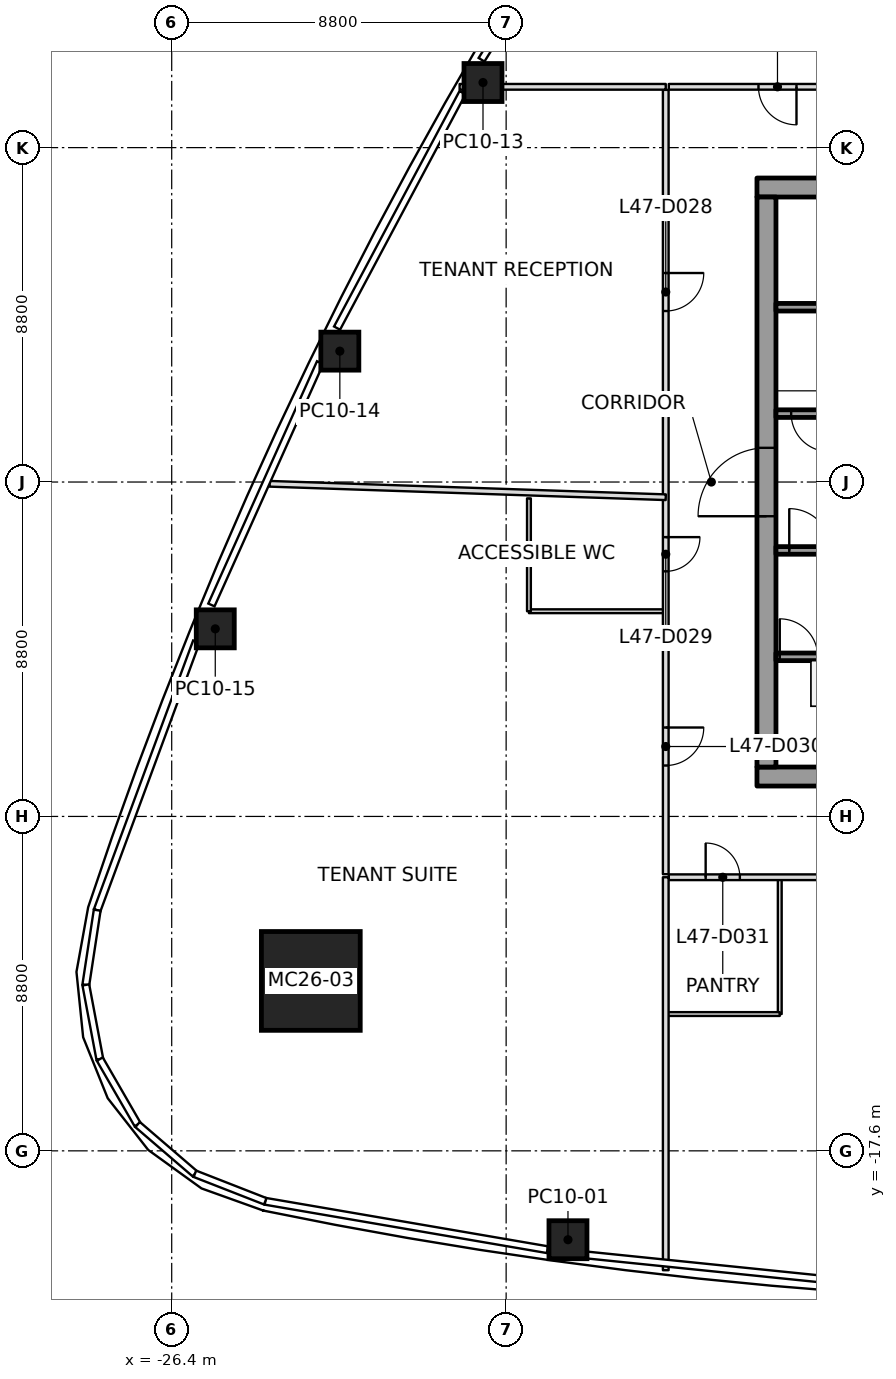
"""IFC4 building model, lengths in metres.
Left out: names, types, materials, properties, quantities, classifications, styles, units other than length and angle.
Written with IfcOpenShell. Run it as: python <this file> out.ifc"""

import sys

from ifc_helpers import new_model, si_unit, direction, frame, frame_2d, origin, origin_2d, place, context, subcontext, project, spatial, rectangle, extrude, clip, halfspace, element, fill, save


model = new_model("IFC4")
c1 = context("Model", 3, precision=1e-05, world=origin(), true_north=direction((0.0, 1.0)))
c2 = subcontext(c1, "Body", "Model", "MODEL_VIEW")
j1 = project(units=[si_unit("LENGTHUNIT", "METRE"), si_unit("PLANEANGLEUNIT", "RADIAN")], contexts=[c1])
p1 = place(None, origin())
s1 = spatial("IfcSite", under=j1, at=p1, CompositionType="ELEMENT")
p2 = place(p1, origin())
s2 = spatial("IfcBuilding", under=s1, at=p2, CompositionType="ELEMENT")
p3 = place(p2, frame((0.0, 0.0, 209.8)))
s3 = spatial("IfcBuildingStorey", under=s2, at=p3, CompositionType="ELEMENT", Elevation=209.8)
p4 = place(p3, frame((-22.74, -13.129, 0.0), z_axis=(0.02793953433, 0.016165887767, 0.999478887468), x_axis=(0.99960961501, -0.000451843769, -0.027935880437)))
e1 = element("IfcColumn", 1, at=p4, inside=s3, PredefinedType="COLUMN", context=c2, shape_type="SweptSolid", body=[
    clip(extrude(rectangle(XDim=2.6, YDim=2.6, at=origin_2d()), origin(), (0.0, 0.0, 1.0), 4.002), halfspace(frame((0.0, 0.0, 3.992)), False)),
])
p5 = place(p3, frame((-15.973, -19.939, 0.0), z_axis=(0.017574453011, 0.010434831475, 0.999791104628), x_axis=(-0.990627244409, 0.135653016155, 0.015997557411)))
e2 = element("IfcColumn", 2, at=p5, inside=s3, PredefinedType="COLUMN", context=c2, shape_type="SweptSolid", body=[
    clip(extrude(rectangle(XDim=1.0, YDim=1.0, at=origin_2d()), origin(), (0.0, 0.0, 1.0), 4.001), halfspace(frame((0.0, 0.0, 3.998)), False)),
])
p6 = place(p3, frame((-18.209, 10.513, 0.0), z_axis=(0.009887049298, -0.00573692984, 0.999934664812), x_axis=(0.499975560967, 0.866039512843, 2.5126546e-05)))
e3 = element("IfcColumn", 3, at=p6, inside=s3, PredefinedType="COLUMN", context=c2, shape_type="SweptSolid", body=[
    clip(extrude(rectangle(XDim=1.0, YDim=1.0, at=origin_2d()), origin(), (0.0, 0.0, 1.0), 4.0), halfspace(frame((0.0, 0.0, 3.999)), False)),
])
p7 = place(p3, frame((-21.976, 3.444, 0.0), z_axis=(0.014097691364, 0.002013955909, 0.999898594398), x_axis=(0.440002016218, 0.897961039861, -0.008012279057)))
e4 = element("IfcColumn", 4, at=p7, inside=s3, PredefinedType="COLUMN", context=c2, shape_type="SweptSolid", body=[
    clip(extrude(rectangle(XDim=1.0, YDim=1.0, at=origin_2d()), origin(), (0.0, 0.0, 1.0), 4.0), halfspace(frame((0.0, 0.0, 3.998)), False)),
])
p8 = place(p3, frame((-25.254, -3.864, 0.0), z_axis=(0.017818543466, 0.010007675097, 0.999791151165), x_axis=(0.378002138805, 0.925666409235, -0.016002558328)))
e5 = element("IfcColumn", 5, at=p8, inside=s3, PredefinedType="COLUMN", context=c2, shape_type="SweptSolid", body=[
    clip(extrude(rectangle(XDim=1.0, YDim=1.0, at=origin_2d()), origin(), (0.0, 0.0, 1.0), 4.001), halfspace(frame((0.0, 0.0, 3.998)), False)),
])
p9 = place(p3, frame((-11.0, -7.75, 0.0), z_axis=(0.0, 0.0, 1.0), x_axis=(1.0, 0.0, 0.0)))
e6 = element("IfcWall", 6, at=p9, inside=s3, PredefinedType="SHEAR", context=c2, shape_type="SweptSolid", body=[
    extrude(rectangle(XDim=22.0, YDim=0.5, at=frame_2d((11.0, 0.0))), origin(), (0.0, 0.0, 1.0), 4.0),
])
p10 = place(p9, frame((10.45, 0.0, 0.0)))
e7 = element("IfcOpeningElement", 7, at=p10, cuts=e6, PredefinedType="OPENING", context=c2, shape_type="SweptSolid", body=[
    extrude(rectangle(XDim=1.1, YDim=2.1, at=frame_2d((0.55, 1.05))), frame((0.0, 0.25, 0.0), z_axis=(0.0, -1.0, 0.0), x_axis=(1.0, 0.0, 0.0)), (0.0, 0.0, 1.0), 0.5),
])
p11 = place(p3, frame((-11.0, 7.75, 0.0), z_axis=(0.0, 0.0, 1.0), x_axis=(1.0, 0.0, 0.0)))
e8 = element("IfcWall", 8, at=p11, inside=s3, PredefinedType="SHEAR", context=c2, shape_type="SweptSolid", body=[
    extrude(rectangle(XDim=22.0, YDim=0.5, at=frame_2d((11.0, 0.0))), origin(), (0.0, 0.0, 1.0), 4.0),
])
p12 = place(p11, frame((10.45, 0.0, 0.0)))
e9 = element("IfcOpeningElement", 9, at=p12, cuts=e8, PredefinedType="OPENING", context=c2, shape_type="SweptSolid", body=[
    extrude(rectangle(XDim=1.1, YDim=2.1, at=frame_2d((0.55, 1.05))), frame((0.0, 0.25, 0.0), z_axis=(0.0, -1.0, 0.0), x_axis=(1.0, 0.0, 0.0)), (0.0, 0.0, 1.0), 0.5),
])
p13 = place(p3, frame((-10.75, -7.5, 0.0), z_axis=(0.0, 0.0, 1.0), x_axis=(0.0, 1.0, 0.0)))
e10 = element("IfcWall", 10, at=p13, inside=s3, PredefinedType="SHEAR", context=c2, shape_type="SweptSolid", body=[
    extrude(rectangle(XDim=15.0, YDim=0.5, at=frame_2d((7.5, 0.0))), origin(), (0.0, 0.0, 1.0), 4.0),
])
p14 = place(p13, frame((6.6, 0.0, 0.0)))
e11 = element("IfcOpeningElement", 11, at=p14, cuts=e10, PredefinedType="OPENING", context=c2, shape_type="SweptSolid", body=[
    extrude(rectangle(XDim=1.8, YDim=2.1, at=frame_2d((0.9, 1.05))), frame((0.0, 0.25, 0.0), z_axis=(0.0, -1.0, 0.0), x_axis=(1.0, 0.0, 0.0)), (0.0, 0.0, 1.0), 0.5),
])
p15 = place(p3, frame((-10.5, -4.6, 0.0), z_axis=(0.0, 0.0, 1.0), x_axis=(1.0, 0.0, 0.0)))
e12 = element("IfcWall", 12, at=p15, inside=s3, PredefinedType="SOLIDWALL", context=c2, shape_type="SweptSolid", body=[
    extrude(rectangle(XDim=1.8, YDim=0.2, at=frame_2d((0.9, 0.0))), origin(), (0.0, 0.0, 1.0), 3.85),
])
p16 = place(p15, frame((0.1, 0.0, 0.0)))
e13 = element("IfcOpeningElement", 13, at=p16, cuts=e12, PredefinedType="OPENING", context=c2, shape_type="SweptSolid", body=[
    extrude(rectangle(XDim=1.0, YDim=2.1, at=frame_2d((0.5, 1.05))), frame((0.0, 0.1, 0.0), z_axis=(0.0, -1.0, 0.0), x_axis=(1.0, 0.0, 0.0)), (0.0, 0.0, 1.0), 0.2),
])
p17 = place(p3, frame((-10.5, -1.8, 0.0), z_axis=(0.0, 0.0, 1.0), x_axis=(1.0, 0.0, 0.0)))
e14 = element("IfcWall", 14, at=p17, inside=s3, PredefinedType="SOLIDWALL", context=c2, shape_type="SweptSolid", body=[
    extrude(rectangle(XDim=1.8, YDim=0.2, at=frame_2d((0.9, 0.0))), origin(), (0.0, 0.0, 1.0), 3.85),
])
p18 = place(p17, frame((0.35, 0.0, 0.0)))
e15 = element("IfcOpeningElement", 15, at=p18, cuts=e14, PredefinedType="OPENING", context=c2, shape_type="SweptSolid", body=[
    extrude(rectangle(XDim=1.1, YDim=2.1, at=frame_2d((0.55, 1.05))), frame((0.0, 0.1, 0.0), z_axis=(0.0, -1.0, 0.0), x_axis=(1.0, 0.0, 0.0)), (0.0, 0.0, 1.0), 0.2),
])
p19 = place(p3, frame((-8.7, 1.8, 0.0), z_axis=(0.0, 0.0, 1.0), x_axis=(-1.0, 0.0, 0.0)))
e16 = element("IfcWall", 16, at=p19, inside=s3, PredefinedType="SOLIDWALL", context=c2, shape_type="SweptSolid", body=[
    extrude(rectangle(XDim=1.8, YDim=0.2, at=frame_2d((0.9, 0.0))), origin(), (0.0, 0.0, 1.0), 3.85),
])
p20 = place(p19, frame((0.4, 0.0, 0.0)))
e17 = element("IfcOpeningElement", 17, at=p20, cuts=e16, PredefinedType="OPENING", context=c2, shape_type="SweptSolid", body=[
    extrude(rectangle(XDim=1.0, YDim=2.1, at=frame_2d((0.5, 1.05))), frame((0.0, 0.1, 0.0), z_axis=(0.0, -1.0, 0.0), x_axis=(1.0, 0.0, 0.0)), (0.0, 0.0, 1.0), 0.2),
])
p21 = place(p3, frame((-8.7, 4.6, 0.0), z_axis=(0.0, 0.0, 1.0), x_axis=(-1.0, 0.0, 0.0)))
e18 = element("IfcWall", 18, at=p21, inside=s3, PredefinedType="SOLIDWALL", context=c2, shape_type="SweptSolid", body=[
    extrude(rectangle(XDim=1.8, YDim=0.2, at=frame_2d((0.9, 0.0))), origin(), (0.0, 0.0, 1.0), 3.85),
])
p22 = place(p3, frame((-13.4, -0.4, 0.0), z_axis=(0.0, 0.0, 1.0), x_axis=(-0.99942554411, 0.033890732954, 0.0)))
e19 = element("IfcWall", 19, at=p22, inside=s3, PredefinedType="PARTITIONING", context=c2, shape_type="SweptSolid", body=[
    extrude(rectangle(XDim=10.431, YDim=0.15, at=frame_2d((5.216, 0.0))), origin(), (0.0, 0.0, 1.0), 3.134),
])
p23 = place(p3, frame((-13.4, 10.4, 0.0), z_axis=(0.0, 0.0, 1.0), x_axis=(-1.0, 0.0, 0.0)))
e20 = element("IfcWall", 20, at=p23, inside=s3, PredefinedType="PARTITIONING", context=c2, shape_type="SweptSolid", body=[
    extrude(rectangle(XDim=5.424, YDim=0.15, at=frame_2d((2.712, 0.0))), origin(), (0.0, 0.0, 1.0), 3.287),
])
p24 = place(p3, frame((-13.4, -10.4, 0.0), z_axis=(0.0, 0.0, 1.0), x_axis=(0.0, -1.0, 0.0)))
e21 = element("IfcWall", 21, at=p24, inside=s3, PredefinedType="PARTITIONING", context=c2, shape_type="SweptSolid", body=[
    extrude(rectangle(XDim=10.341, YDim=0.15, at=frame_2d((5.17, 0.0))), origin(), (0.0, 0.0, 1.0), 3.134),
])
p25 = place(p3, frame((-13.4, 10.32, 0.0), z_axis=(0.0, 0.0, 1.0), x_axis=(0.0, -1.0, 0.0)))
e22 = element("IfcWall", 22, at=p25, inside=s3, PredefinedType="PARTITIONING", context=c2, shape_type="SweptSolid", body=[
    extrude(rectangle(XDim=20.64, YDim=0.15, at=frame_2d((10.32, 0.0))), origin(), (0.0, 0.0, 1.0), 3.066),
])
p26 = place(p25, frame((4.82, 0.0, 0.0)))
e23 = element("IfcOpeningElement", 23, at=p26, cuts=e22, PredefinedType="OPENING", context=c2, shape_type="SweptSolid", body=[
    extrude(rectangle(XDim=1.0, YDim=2.1, at=frame_2d((0.5, 1.05))), frame((0.0, 0.075, 0.0), z_axis=(0.0, -1.0, 0.0), x_axis=(1.0, 0.0, 0.0)), (0.0, 0.0, 1.0), 0.15),
])
p27 = place(p25, frame((11.77, 0.0, 0.0)))
e24 = element("IfcOpeningElement", 24, at=p27, cuts=e22, PredefinedType="OPENING", context=c2, shape_type="SweptSolid", body=[
    extrude(rectangle(XDim=0.9, YDim=2.1, at=frame_2d((0.45, 1.05))), frame((0.0, 0.075, 0.0), z_axis=(0.0, -1.0, 0.0), x_axis=(1.0, 0.0, 0.0)), (0.0, 0.0, 1.0), 0.15),
])
p28 = place(p25, frame((16.78, 0.0, 0.0)))
e25 = element("IfcOpeningElement", 25, at=p28, cuts=e22, PredefinedType="OPENING", context=c2, shape_type="SweptSolid", body=[
    extrude(rectangle(XDim=1.0, YDim=2.1, at=frame_2d((0.5, 1.05))), frame((0.0, 0.075, 0.0), z_axis=(0.0, -1.0, 0.0), x_axis=(1.0, 0.0, 0.0)), (0.0, 0.0, 1.0), 0.15),
])
p29 = place(p3, frame((-13.32, -10.4, 0.0), z_axis=(0.0, 0.0, 1.0), x_axis=(1.0, 0.0, 0.0)))
e26 = element("IfcWall", 26, at=p29, inside=s3, PredefinedType="PARTITIONING", context=c2, shape_type="SweptSolid", body=[
    extrude(rectangle(XDim=26.64, YDim=0.15, at=frame_2d((13.32, 0.0))), origin(), (0.0, 0.0, 1.0), 3.138),
])
p30 = place(p29, frame((0.97, 0.0, 0.0)))
e27 = element("IfcOpeningElement", 27, at=p30, cuts=e26, PredefinedType="OPENING", context=c2, shape_type="SweptSolid", body=[
    extrude(rectangle(XDim=0.9, YDim=2.1, at=frame_2d((0.45, 1.05))), frame((0.0, 0.075, 0.0), z_axis=(0.0, -1.0, 0.0), x_axis=(1.0, 0.0, 0.0)), (0.0, 0.0, 1.0), 0.15),
])
p31 = place(p29, frame((7.12, 0.0, 0.0)))
e28 = element("IfcOpeningElement", 28, at=p31, cuts=e26, PredefinedType="OPENING", context=c2, shape_type="SweptSolid", body=[
    extrude(rectangle(XDim=1.0, YDim=2.1, at=frame_2d((0.5, 1.05))), frame((0.0, 0.075, 0.0), z_axis=(0.0, -1.0, 0.0), x_axis=(1.0, 0.0, 0.0)), (0.0, 0.0, 1.0), 0.15),
])
p32 = place(p29, frame((13.27, 0.0, 0.0)))
e29 = element("IfcOpeningElement", 29, at=p32, cuts=e26, PredefinedType="OPENING", context=c2, shape_type="SweptSolid", body=[
    extrude(rectangle(XDim=0.9, YDim=2.1, at=frame_2d((0.45, 1.05))), frame((0.0, 0.075, 0.0), z_axis=(0.0, -1.0, 0.0), x_axis=(1.0, 0.0, 0.0)), (0.0, 0.0, 1.0), 0.15),
])
p33 = place(p29, frame((20.52, 0.0, 0.0)))
e30 = element("IfcOpeningElement", 30, at=p33, cuts=e26, PredefinedType="OPENING", context=c2, shape_type="SweptSolid", body=[
    extrude(rectangle(XDim=1.0, YDim=2.1, at=frame_2d((0.5, 1.05))), frame((0.0, 0.075, 0.0), z_axis=(0.0, -1.0, 0.0), x_axis=(1.0, 0.0, 0.0)), (0.0, 0.0, 1.0), 0.15),
])
p34 = place(p3, frame((13.32, 10.4, 0.0), z_axis=(0.0, 0.0, 1.0), x_axis=(-1.0, 0.0, 0.0)))
e31 = element("IfcWall", 31, at=p34, inside=s3, PredefinedType="PARTITIONING", context=c2, shape_type="SweptSolid", body=[
    extrude(rectangle(XDim=26.64, YDim=0.15, at=frame_2d((13.32, 0.0))), origin(), (0.0, 0.0, 1.0), 3.066),
])
p35 = place(p34, frame((1.95, 0.0, 0.0)))
e32 = element("IfcOpeningElement", 32, at=p35, cuts=e31, PredefinedType="OPENING", context=c2, shape_type="SweptSolid", body=[
    extrude(rectangle(XDim=0.9, YDim=2.1, at=frame_2d((0.45, 1.05))), frame((0.0, 0.075, 0.0), z_axis=(0.0, -1.0, 0.0), x_axis=(1.0, 0.0, 0.0)), (0.0, 0.0, 1.0), 0.15),
])
p36 = place(p34, frame((10.86, 0.0, 0.0)))
e33 = element("IfcOpeningElement", 33, at=p36, cuts=e31, PredefinedType="OPENING", context=c2, shape_type="SweptSolid", body=[
    extrude(rectangle(XDim=1.0, YDim=2.1, at=frame_2d((0.5, 1.05))), frame((0.0, 0.075, 0.0), z_axis=(0.0, -1.0, 0.0), x_axis=(1.0, 0.0, 0.0)), (0.0, 0.0, 1.0), 0.15),
])
p37 = place(p34, frame((18.77, 0.0, 0.0)))
e34 = element("IfcOpeningElement", 34, at=p37, cuts=e31, PredefinedType="OPENING", context=c2, shape_type="SweptSolid", body=[
    extrude(rectangle(XDim=0.9, YDim=2.1, at=frame_2d((0.45, 1.05))), frame((0.0, 0.075, 0.0), z_axis=(0.0, -1.0, 0.0), x_axis=(1.0, 0.0, 0.0)), (0.0, 0.0, 1.0), 0.15),
])
p38 = place(p34, frame((23.28, 0.0, 0.0)))
e35 = element("IfcOpeningElement", 35, at=p38, cuts=e31, PredefinedType="OPENING", context=c2, shape_type="SweptSolid", body=[
    extrude(rectangle(XDim=1.0, YDim=2.1, at=frame_2d((0.5, 1.05))), frame((0.0, 0.075, 0.0), z_axis=(0.0, -1.0, 0.0), x_axis=(1.0, 0.0, 0.0)), (0.0, 0.0, 1.0), 0.15),
])
p39 = place(p3, frame((-13.43, -3.4, 0.0), z_axis=(0.0, 0.0, 1.0), x_axis=(-1.0, 0.0, 0.0)))
e36 = element("IfcWall", 36, at=p39, inside=s3, PredefinedType="PARTITIONING", context=c2, shape_type="SweptSolid", body=[
    extrude(rectangle(XDim=3.57, YDim=0.1, at=frame_2d((1.785, 0.0))), origin(), (0.0, 0.0, 1.0), 3.138),
])
p40 = place(p3, frame((-17.0, -3.4, 0.0), z_axis=(0.0, 0.0, 1.0), x_axis=(0.0, 1.0, 0.0)))
e37 = element("IfcWall", 37, at=p40, inside=s3, PredefinedType="PARTITIONING", context=c2, shape_type="SweptSolid", body=[
    extrude(rectangle(XDim=2.97, YDim=0.1, at=frame_2d((1.485, 0.0))), origin(), (0.0, 0.0, 1.0), 3.138),
])
p41 = place(p3, frame((-10.4, -10.43, 0.0), z_axis=(0.0, 0.0, 1.0), x_axis=(0.0, -1.0, 0.0)))
e38 = element("IfcWall", 38, at=p41, inside=s3, PredefinedType="PARTITIONING", context=c2, shape_type="SweptSolid", body=[
    extrude(rectangle(XDim=3.57, YDim=0.1, at=frame_2d((1.785, 0.0))), origin(), (0.0, 0.0, 1.0), 3.35),
])
p42 = place(p3, frame((-10.4, -14.0, 0.0), z_axis=(0.0, 0.0, 1.0), x_axis=(-1.0, 0.0, 0.0)))
e39 = element("IfcWall", 39, at=p42, inside=s3, PredefinedType="PARTITIONING", context=c2, shape_type="SweptSolid", body=[
    extrude(rectangle(XDim=2.97, YDim=0.1, at=frame_2d((1.485, 0.0))), origin(), (0.0, 0.0, 1.0), 3.206),
])
p43 = place(p38, origin())
e40 = element("IfcDoor", 40, at=p43, inside=s3, OperationType="SINGLE_SWING_RIGHT", PredefinedType="DOOR", context=c2, shape_type="SweptSolid", body=[
    extrude(rectangle(XDim=1.0, YDim=2.1, at=frame_2d((0.5, 1.05))), frame((0.0, 0.025, 0.0), z_axis=(0.0, -1.0, 0.0), x_axis=(1.0, 0.0, 0.0)), (0.0, 0.0, 1.0), 0.05),
])
fill(e35, e40)
p44 = place(p26, origin())
e41 = element("IfcDoor", 41, at=p44, inside=s3, OperationType="SINGLE_SWING_LEFT", PredefinedType="DOOR", context=c2, shape_type="SweptSolid", body=[
    extrude(rectangle(XDim=1.0, YDim=2.1, at=frame_2d((0.5, 1.05))), frame((0.0, 0.025, 0.0), z_axis=(0.0, -1.0, 0.0), x_axis=(1.0, 0.0, 0.0)), (0.0, 0.0, 1.0), 0.05),
])
fill(e23, e41)
p45 = place(p27, origin())
e42 = element("IfcDoor", 42, at=p45, inside=s3, OperationType="SINGLE_SWING_RIGHT", PredefinedType="DOOR", context=c2, shape_type="SweptSolid", body=[
    extrude(rectangle(XDim=0.9, YDim=2.1, at=frame_2d((0.45, 1.05))), frame((0.0, 0.025, 0.0), z_axis=(0.0, -1.0, 0.0), x_axis=(1.0, 0.0, 0.0)), (0.0, 0.0, 1.0), 0.05),
])
fill(e24, e42)
p46 = place(p28, origin())
e43 = element("IfcDoor", 43, at=p46, inside=s3, OperationType="SINGLE_SWING_RIGHT", PredefinedType="DOOR", context=c2, shape_type="SweptSolid", body=[
    extrude(rectangle(XDim=1.0, YDim=2.1, at=frame_2d((0.5, 1.05))), frame((0.0, 0.025, 0.0), z_axis=(0.0, -1.0, 0.0), x_axis=(1.0, 0.0, 0.0)), (0.0, 0.0, 1.0), 0.05),
])
fill(e25, e43)
p47 = place(p30, origin())
e44 = element("IfcDoor", 44, at=p47, inside=s3, OperationType="SINGLE_SWING_RIGHT", PredefinedType="DOOR", context=c2, shape_type="SweptSolid", body=[
    extrude(rectangle(XDim=0.9, YDim=2.1, at=frame_2d((0.45, 1.05))), frame((0.0, 0.025, 0.0), z_axis=(0.0, -1.0, 0.0), x_axis=(1.0, 0.0, 0.0)), (0.0, 0.0, 1.0), 0.05),
])
fill(e27, e44)
p48 = place(p18, origin())
e45 = element("IfcDoor", 45, at=p48, inside=s3, OperationType="SINGLE_SWING_RIGHT", PredefinedType="DOOR", context=c2, shape_type="SweptSolid", body=[
    extrude(rectangle(XDim=1.1, YDim=2.1, at=frame_2d((0.55, 1.05))), frame((0.0, 0.025, 0.0), z_axis=(0.0, -1.0, 0.0), x_axis=(1.0, 0.0, 0.0)), (0.0, 0.0, 1.0), 0.05),
])
fill(e15, e45)
p49 = place(p20, origin())
e46 = element("IfcDoor", 46, at=p49, inside=s3, OperationType="SINGLE_SWING_RIGHT", PredefinedType="DOOR", context=c2, shape_type="SweptSolid", body=[
    extrude(rectangle(XDim=1.0, YDim=2.1, at=frame_2d((0.5, 1.05))), frame((0.0, 0.025, 0.0), z_axis=(0.0, -1.0, 0.0), x_axis=(1.0, 0.0, 0.0)), (0.0, 0.0, 1.0), 0.05),
])
fill(e17, e46)
p50 = place(p16, origin())
e47 = element("IfcDoor", 47, at=p50, inside=s3, OperationType="SINGLE_SWING_LEFT", PredefinedType="DOOR", context=c2, shape_type="SweptSolid", body=[
    extrude(rectangle(XDim=1.0, YDim=2.1, at=frame_2d((0.5, 1.05))), frame((0.0, 0.025, 0.0), z_axis=(0.0, -1.0, 0.0), x_axis=(1.0, 0.0, 0.0)), (0.0, 0.0, 1.0), 0.05),
])
fill(e13, e47)
p51 = place(p14, origin())
e48 = element("IfcDoor", 48, at=p51, inside=s3, OperationType="DOUBLE_DOOR_SINGLE_SWING", PredefinedType="DOOR", context=c2, shape_type="SweptSolid", body=[
    extrude(rectangle(XDim=1.8, YDim=2.1, at=frame_2d((0.9, 1.05))), frame((0.0, 0.025, 0.0), z_axis=(0.0, -1.0, 0.0), x_axis=(1.0, 0.0, 0.0)), (0.0, 0.0, 1.0), 0.05),
])
fill(e11, e48)
save(model, sys.argv[1])
